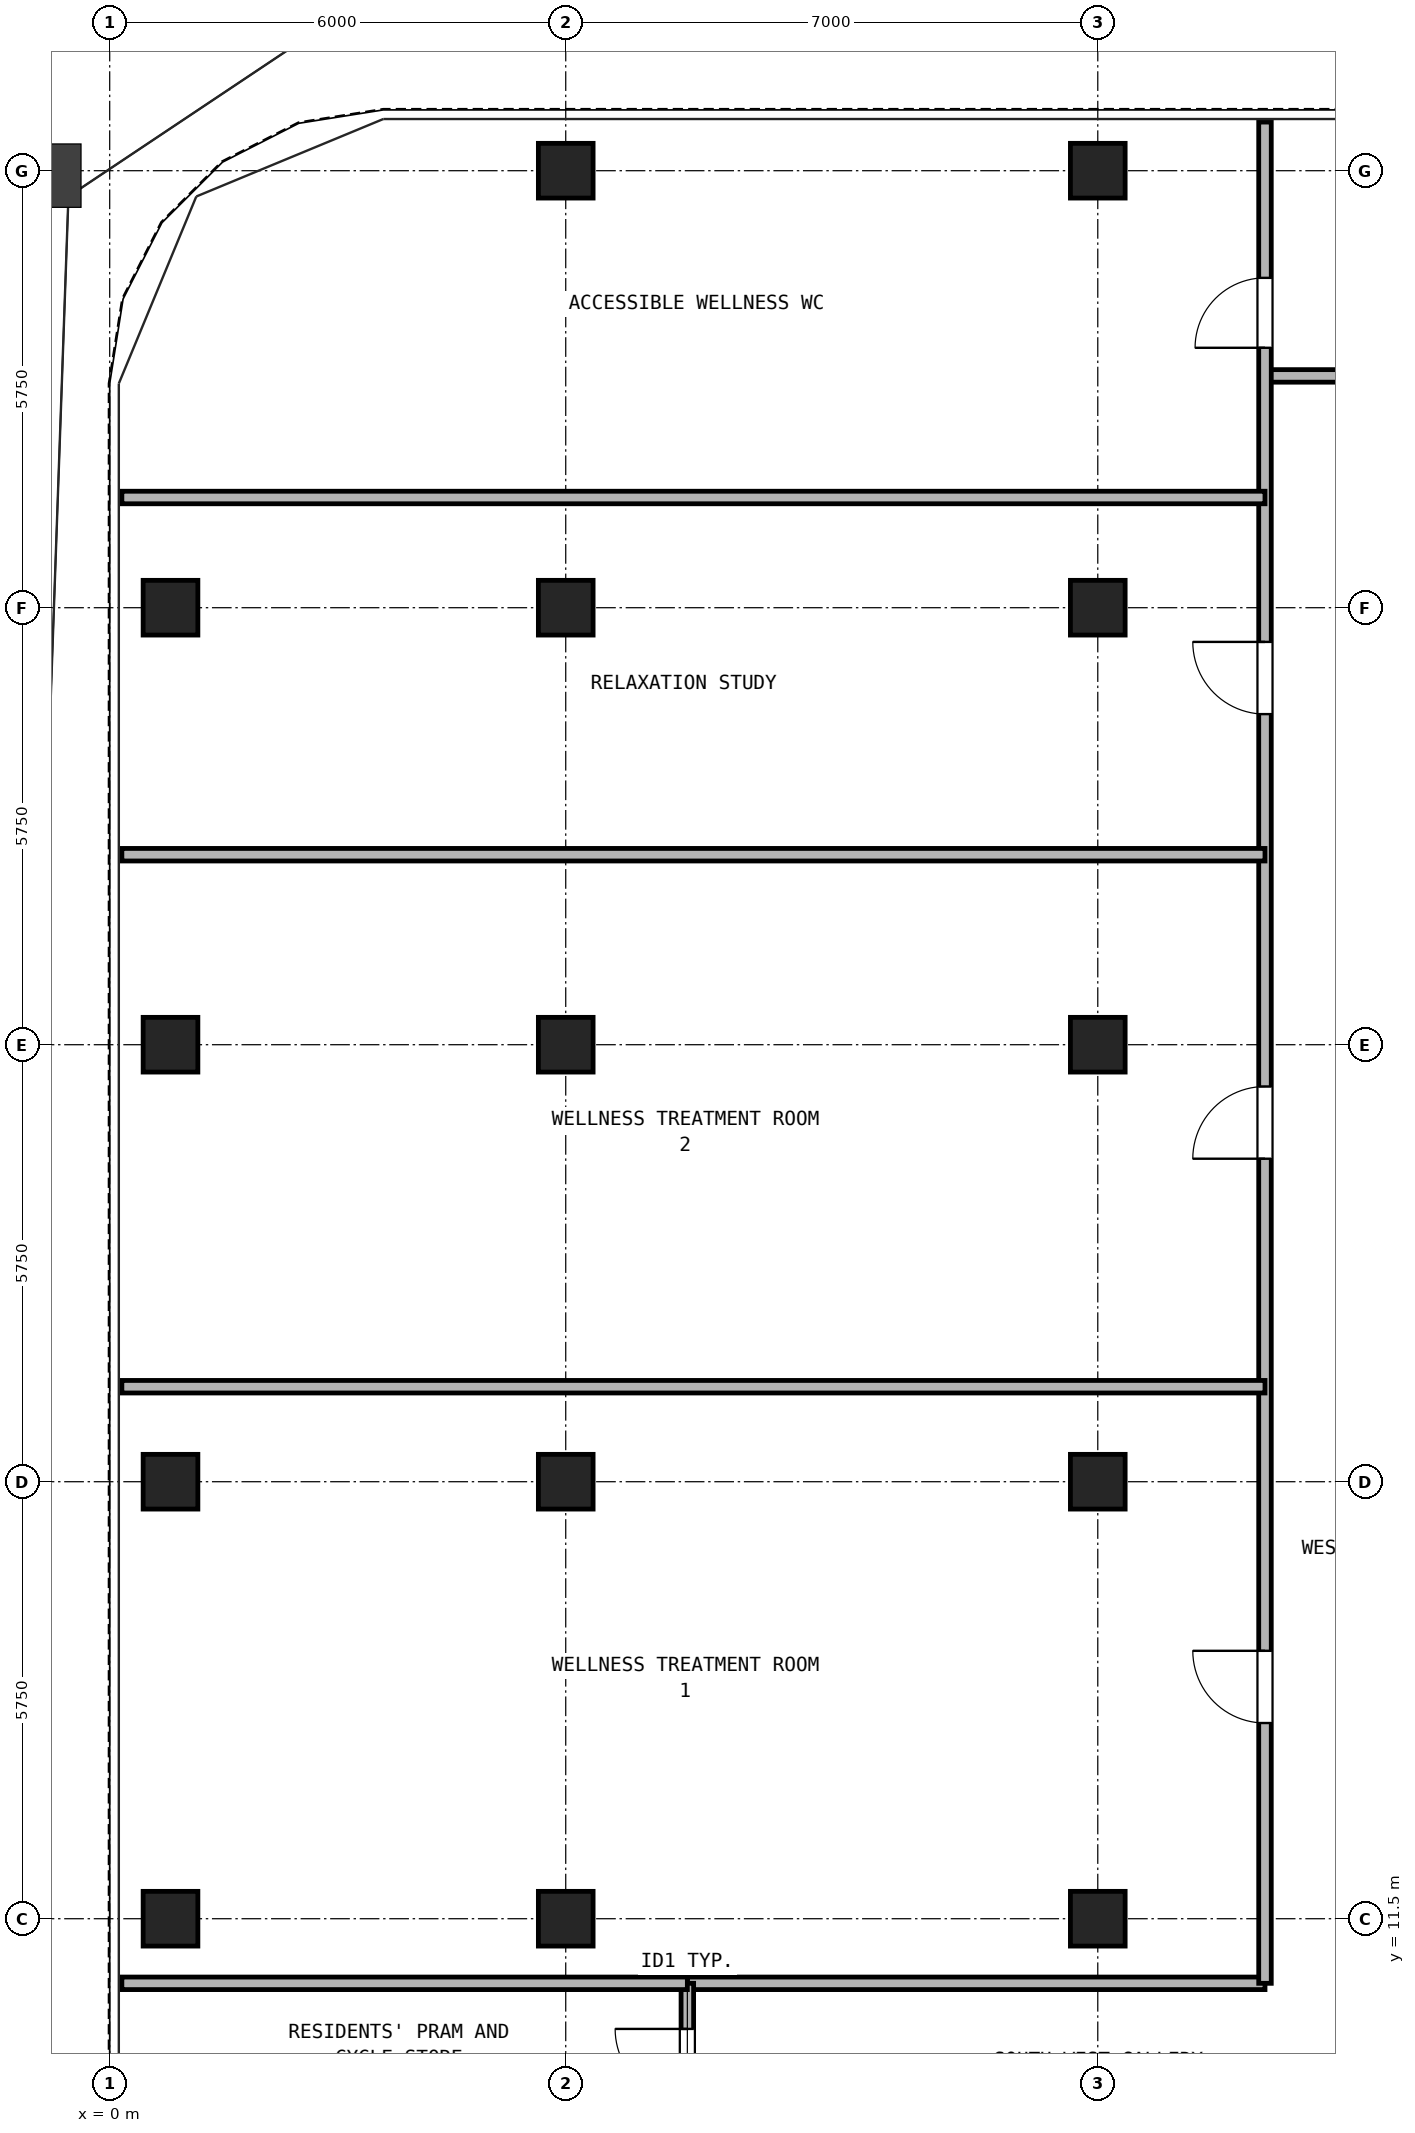
"""IFC4 building model, lengths in metres.
Left out: names, types, materials, properties, quantities, classifications, styles, units other than length and angle.
Written with IfcOpenShell. Run it as: python <this file> out.ifc"""

import sys

from ifc_helpers import new_model, si_unit, direction, frame, frame_2d, origin, origin_2d, place, context, subcontext, project, spatial, rectangle, hollow_rectangle, extrude, source, transform, mapped, element, fill, save


model = new_model("IFC4")
c1 = context("Model", 3, precision=1e-05, world=origin(), true_north=direction((0.0, 1.0)))
c2 = subcontext(c1, "Body", "Model", "MODEL_VIEW")
j1 = project(units=[si_unit("LENGTHUNIT", "METRE"), si_unit("PLANEANGLEUNIT", "RADIAN")], contexts=[c1])
p1 = place(None, origin())
s1 = spatial("IfcSite", under=j1, at=p1, CompositionType="ELEMENT")
p2 = place(p1, origin())
s2 = spatial("IfcBuilding", under=s1, at=p2, CompositionType="ELEMENT")
p3 = place(p2, frame((0.0, 0.0, 162.5)))
s3 = spatial("IfcBuildingStorey", under=s2, at=p3, CompositionType="ELEMENT", Elevation=162.5)
m1 = source(origin(), c2, "Body", "SweptSolid", [
    extrude(hollow_rectangle(XDim=0.72, YDim=0.72, WallThickness=0.04, at=origin_2d()), origin(), (0.0, 0.0, 1.0), 2.95),
])
for number, where, z_axis, x_axis in (
    (1, (6.0, 34.5, 0.0), (0.0, 0.0, 1.0), (1.0, 0.0, 0.0)),
    (2, (13.0, 34.5, 0.0), (0.0, 0.0, 1.0), (1.0, 0.0, 0.0)),
    (3, (0.8, 11.5, 0.0), (0.0, 0.0, 1.0), (1.0, 0.0, 0.0)),
    (4, (0.8, 17.25, 0.0), (0.0, 0.0, 1.0), (1.0, 0.0, 0.0)),
    (5, (0.8, 23.0, 0.0), (0.0, 0.0, 1.0), (1.0, 0.0, 0.0)),
    (6, (0.8, 28.75, 0.0), (0.0, 0.0, 1.0), (1.0, 0.0, 0.0)),
    (7, (6.0, 11.5, 0.0), (0.0, 0.0, 1.0), (1.0, 0.0, 0.0)),
    (8, (6.0, 17.25, 0.0), (0.0, 0.0, 1.0), (1.0, 0.0, 0.0)),
    (9, (6.0, 23.0, 0.0), (0.0, 0.0, 1.0), (1.0, 0.0, 0.0)),
    (10, (6.0, 28.75, 0.0), (0.0, 0.0, 1.0), (1.0, 0.0, 0.0)),
    (11, (13.0, 11.5, 0.0), (0.0, 0.0, 1.0), (1.0, 0.0, 0.0)),
    (12, (13.0, 17.25, 0.0), (0.0, 0.0, 1.0), (1.0, 0.0, 0.0)),
    (13, (13.0, 23.0, 0.0), (0.0, 0.0, 1.0), (1.0, 0.0, 0.0)),
    (14, (13.0, 28.75, 0.0), (0.0, 0.0, 1.0), (1.0, 0.0, 0.0)),
):
    element("IfcColumn", number, at=place(p3, frame(where, z_axis=z_axis, x_axis=x_axis)), inside=s3, PredefinedType="COLUMN", context=c2, shape_type="MappedRepresentation", body=[
        mapped(m1, transform((0.0, 0.0, 0.0), x_axis=(1.0, 0.0, 0.0), y_axis=(0.0, 1.0, 0.0), z_axis=(0.0, 0.0, 1.0), scale=1.0)),
    ])
p4 = place(p3, frame((7.6, 10.65, 0.0), z_axis=(0.0, 0.0, 1.0), x_axis=(1.0, 0.0, 0.0)))
e15 = element("IfcWall", 15, at=p4, inside=s3, PredefinedType="PARTITIONING", context=c2, shape_type="SweptSolid", body=[
    extrude(rectangle(XDim=7.6, YDim=0.165, at=frame_2d((3.8, 0.0))), origin(), (0.0, 0.0, 1.0), 2.95),
])
p5 = place(p3, frame((7.6, 8.65, 0.0), z_axis=(0.0, 0.0, 1.0), x_axis=(0.0, 1.0, 0.0)))
e16 = element("IfcWall", 16, at=p5, inside=s3, PredefinedType="PARTITIONING", context=c2, shape_type="SweptSolid", body=[
    extrude(rectangle(XDim=2.0, YDim=0.165, at=frame_2d((1.0, 0.0))), origin(), (0.0, 0.0, 1.0), 2.95),
])
p6 = place(p5, frame((0.45, 0.0, 0.0)))
e17 = element("IfcOpeningElement", 17, at=p6, cuts=e16, PredefinedType="OPENING", context=c2, shape_type="SweptSolid", body=[
    extrude(rectangle(XDim=0.95, YDim=2.15, at=frame_2d((0.475, 1.075))), frame((0.0, 0.093, 0.0), z_axis=(0.0, -1.0, 0.0), x_axis=(1.0, 0.0, 0.0)), (0.0, 0.0, 1.0), 0.185),
])
p7 = place(p3, frame((15.2, 31.8, 0.0), z_axis=(0.0, 0.0, 1.0), x_axis=(1.0, 0.0, 0.0)))
e18 = element("IfcWall", 18, at=p7, inside=s3, PredefinedType="PARTITIONING", context=c2, shape_type="SweptSolid", body=[
    extrude(rectangle(XDim=16.6, YDim=0.165, at=frame_2d((8.3, 0.0))), origin(), (0.0, 0.0, 1.0), 2.583),
])
p8 = place(p7, frame((3.65, 0.0, 0.0)))
e19 = element("IfcOpeningElement", 19, at=p8, cuts=e18, PredefinedType="OPENING", context=c2, shape_type="SweptSolid", body=[
    extrude(rectangle(XDim=0.95, YDim=2.15, at=frame_2d((0.475, 1.075))), frame((0.0, 0.093, 0.0), z_axis=(0.0, -1.0, 0.0), x_axis=(1.0, 0.0, 0.0)), (0.0, 0.0, 1.0), 0.185),
])
p9 = place(p7, frame((9.1, 0.0, 0.0)))
e20 = element("IfcOpeningElement", 20, at=p9, cuts=e18, PredefinedType="OPENING", context=c2, shape_type="SweptSolid", body=[
    extrude(rectangle(XDim=0.95, YDim=2.15, at=frame_2d((0.475, 1.075))), frame((0.0, 0.093, 0.0), z_axis=(0.0, -1.0, 0.0), x_axis=(1.0, 0.0, 0.0)), (0.0, 0.0, 1.0), 0.185),
])
p10 = place(p7, frame((13.25, 0.0, 0.0)))
e21 = element("IfcOpeningElement", 21, at=p10, cuts=e18, PredefinedType="OPENING", context=c2, shape_type="SweptSolid", body=[
    extrude(rectangle(XDim=0.92, YDim=2.1, at=frame_2d((0.46, 1.05))), frame((0.0, 0.093, 0.0), z_axis=(0.0, -1.0, 0.0), x_axis=(1.0, 0.0, 0.0)), (0.0, 0.0, 1.0), 0.185),
])
p11 = place(p3, frame((15.2, 10.65, 0.0), z_axis=(0.0, 0.0, 1.0), x_axis=(0.0, 1.0, 0.0)))
e22 = element("IfcWall", 22, at=p11, inside=s3, PredefinedType="PARTITIONING", context=c2, shape_type="SweptSolid", body=[
    extrude(rectangle(XDim=24.49, YDim=0.165, at=frame_2d((12.245, 0.0))), origin(), (0.0, 0.0, 1.0), 2.95),
])
p12 = place(p11, frame((3.425, 0.0, 0.0)))
e23 = element("IfcOpeningElement", 23, at=p12, cuts=e22, PredefinedType="OPENING", context=c2, shape_type="SweptSolid", body=[
    extrude(rectangle(XDim=0.95, YDim=2.15, at=frame_2d((0.475, 1.075))), frame((0.0, 0.093, 0.0), z_axis=(0.0, -1.0, 0.0), x_axis=(1.0, 0.0, 0.0)), (0.0, 0.0, 1.0), 0.185),
])
p13 = place(p11, frame((10.85, 0.0, 0.0)))
e24 = element("IfcOpeningElement", 24, at=p13, cuts=e22, PredefinedType="OPENING", context=c2, shape_type="SweptSolid", body=[
    extrude(rectangle(XDim=0.95, YDim=2.15, at=frame_2d((0.475, 1.075))), frame((0.0, 0.093, 0.0), z_axis=(0.0, -1.0, 0.0), x_axis=(1.0, 0.0, 0.0)), (0.0, 0.0, 1.0), 0.185),
])
p14 = place(p11, frame((16.7, 0.0, 0.0)))
e25 = element("IfcOpeningElement", 25, at=p14, cuts=e22, PredefinedType="OPENING", context=c2, shape_type="SweptSolid", body=[
    extrude(rectangle(XDim=0.95, YDim=2.15, at=frame_2d((0.475, 1.075))), frame((0.0, 0.093, 0.0), z_axis=(0.0, -1.0, 0.0), x_axis=(1.0, 0.0, 0.0)), (0.0, 0.0, 1.0), 0.185),
])
p15 = place(p11, frame((21.52, 0.0, 0.0)))
e26 = element("IfcOpeningElement", 26, at=p15, cuts=e22, PredefinedType="OPENING", context=c2, shape_type="SweptSolid", body=[
    extrude(rectangle(XDim=0.92, YDim=2.1, at=frame_2d((0.46, 1.05))), frame((0.0, 0.093, 0.0), z_axis=(0.0, -1.0, 0.0), x_axis=(1.0, 0.0, 0.0)), (0.0, 0.0, 1.0), 0.185),
])
p16 = place(p3, frame((0.16, 10.65, 0.0), z_axis=(0.0, 0.0, 1.0), x_axis=(1.0, 0.0, 0.0)))
e27 = element("IfcWall", 27, at=p16, inside=s3, PredefinedType="PARTITIONING", context=c2, shape_type="SweptSolid", body=[
    extrude(rectangle(XDim=7.44, YDim=0.165, at=frame_2d((3.72, 0.0))), origin(), (0.0, 0.0, 1.0), 2.95),
])
for number, where, z_axis, x_axis in (
    (28, (0.16, 18.5, 0.0), (0.0, 0.0, 1.0), (1.0, 0.0, 0.0)),
    (29, (0.16, 25.5, 0.0), (0.0, 0.0, 1.0), (1.0, 0.0, 0.0)),
    (30, (0.16, 30.2, 0.0), (0.0, 0.0, 1.0), (1.0, 0.0, 0.0)),
):
    element("IfcWall", number, at=place(p3, frame(where, z_axis=z_axis, x_axis=x_axis)), inside=s3, PredefinedType="PARTITIONING", context=c2, shape_type="SweptSolid", body=[
        extrude(rectangle(XDim=15.04, YDim=0.165, at=frame_2d((7.52, 0.0))), origin(), (0.0, 0.0, 1.0), 2.95),
    ])
p17 = place(p6, frame((0.95, 0.0, 0.0), z_axis=(0.0, 0.0, 1.0), x_axis=(-1.0, 0.0, 0.0)))
e31 = element("IfcDoor", 31, at=p17, inside=s3, OperationType="SINGLE_SWING_RIGHT", PredefinedType="DOOR", context=c2, shape_type="SweptSolid", body=[
    extrude(rectangle(XDim=0.95, YDim=2.15, at=frame_2d((0.475, 1.075))), frame((0.0, 0.025, 0.0), z_axis=(0.0, -1.0, 0.0), x_axis=(1.0, 0.0, 0.0)), (0.0, 0.0, 1.0), 0.05),
])
fill(e17, e31)
p18 = place(p12, frame((0.95, 0.0, 0.0), z_axis=(0.0, 0.0, 1.0), x_axis=(-1.0, 0.0, 0.0)))
e32 = element("IfcDoor", 32, at=p18, inside=s3, OperationType="SINGLE_SWING_RIGHT", PredefinedType="DOOR", context=c2, shape_type="SweptSolid", body=[
    extrude(rectangle(XDim=0.95, YDim=2.15, at=frame_2d((0.475, 1.075))), frame((0.0, 0.025, 0.0), z_axis=(0.0, -1.0, 0.0), x_axis=(1.0, 0.0, 0.0)), (0.0, 0.0, 1.0), 0.05),
])
fill(e23, e32)
p19 = place(p13, frame((0.95, 0.0, 0.0), z_axis=(0.0, 0.0, 1.0), x_axis=(-1.0, 0.0, 0.0)))
e33 = element("IfcDoor", 33, at=p19, inside=s3, OperationType="SINGLE_SWING_LEFT", PredefinedType="DOOR", context=c2, shape_type="SweptSolid", body=[
    extrude(rectangle(XDim=0.95, YDim=2.15, at=frame_2d((0.475, 1.075))), frame((0.0, 0.025, 0.0), z_axis=(0.0, -1.0, 0.0), x_axis=(1.0, 0.0, 0.0)), (0.0, 0.0, 1.0), 0.05),
])
fill(e24, e33)
p20 = place(p14, frame((0.95, 0.0, 0.0), z_axis=(0.0, 0.0, 1.0), x_axis=(-1.0, 0.0, 0.0)))
e34 = element("IfcDoor", 34, at=p20, inside=s3, OperationType="SINGLE_SWING_RIGHT", PredefinedType="DOOR", context=c2, shape_type="SweptSolid", body=[
    extrude(rectangle(XDim=0.95, YDim=2.15, at=frame_2d((0.475, 1.075))), frame((0.0, 0.025, 0.0), z_axis=(0.0, -1.0, 0.0), x_axis=(1.0, 0.0, 0.0)), (0.0, 0.0, 1.0), 0.05),
])
fill(e25, e34)
p21 = place(p15, frame((0.92, 0.0, 0.0), z_axis=(0.0, 0.0, 1.0), x_axis=(-1.0, 0.0, 0.0)))
e35 = element("IfcDoor", 35, at=p21, inside=s3, OperationType="SINGLE_SWING_LEFT", PredefinedType="DOOR", context=c2, shape_type="SweptSolid", body=[
    extrude(rectangle(XDim=0.92, YDim=2.1, at=frame_2d((0.46, 1.05))), frame((0.0, 0.025, 0.0), z_axis=(0.0, -1.0, 0.0), x_axis=(1.0, 0.0, 0.0)), (0.0, 0.0, 1.0), 0.05),
])
fill(e26, e35)
save(model, sys.argv[1])
